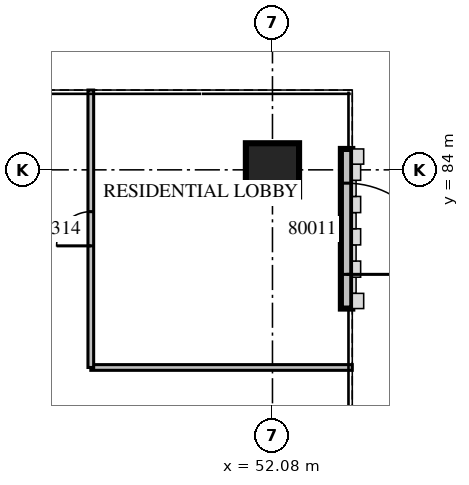
"""IFC4 building model, lengths in metres.
Left out: names, types, materials, properties, quantities, classifications, styles, units other than length and angle.
Written with IfcOpenShell. Run it as: python <this file> out.ifc"""

import sys

from ifc_helpers import new_model, si_unit, direction, frame, frame_2d, origin, origin_2d, place, context, subcontext, project, spatial, rectangle, extrude, source, transform, mapped, element, fill, save


model = new_model("IFC4")
c1 = context("Model", 3, precision=1e-05, world=origin(), true_north=direction((0.0, 1.0)))
c2 = subcontext(c1, "Body", "Model", "MODEL_VIEW")
j1 = project(units=[si_unit("LENGTHUNIT", "METRE"), si_unit("PLANEANGLEUNIT", "RADIAN")], contexts=[c1])
p1 = place(None, origin())
s1 = spatial("IfcSite", under=j1, at=p1, CompositionType="ELEMENT")
p2 = place(p1, origin())
s2 = spatial("IfcBuilding", under=s1, at=p2, CompositionType="ELEMENT")
p3 = place(p2, origin())
s3 = spatial("IfcBuildingStorey", under=s2, at=p3, CompositionType="ELEMENT", Elevation=0.0)
m1 = source(origin(), c2, "Body", "SweptSolid", [
    extrude(rectangle(XDim=1.4, YDim=1.4, at=origin_2d()), origin(), (0.0, 0.0, 1.0), 7.5),
])
p4 = place(p3, frame((52.08, 84.0, 0.0), z_axis=(0.0, 0.0, 1.0), x_axis=(1.0, 0.0, 0.0)))
e1 = element("IfcColumn", 1, at=p4, inside=s3, PredefinedType="COLUMN", context=c2, shape_type="MappedRepresentation", body=[
    mapped(m1, transform((0.0, 0.0, 0.0), scale=1.0)),
])
m2 = source(origin(), c2, "Body", "SweptSolid", [
    extrude(rectangle(XDim=4.2, YDim=0.3, at=frame_2d((2.1, 0.0))), origin(), (0.0, 0.0, 1.0), 6.9),
])
p5 = place(p3, frame((54.03, 80.35, 0.0), z_axis=(0.0, 0.0, 1.0), x_axis=(0.0, 1.0, 0.0)))
e2 = element("IfcWall", 2, at=p5, inside=s3, PredefinedType="STANDARD", context=c2, shape_type="MappedRepresentation", body=[
    mapped(m2, transform((0.0, 0.0, 0.0), scale=1.0)),
])
m3 = source(origin(), c2, "Body", "SweptSolid", [
    extrude(rectangle(XDim=2.4, YDim=2.4, at=frame_2d((1.2, 1.2))), frame((0.0, 0.16, 0.0), z_axis=(0.0, -1.0, 0.0), x_axis=(1.0, 0.0, 0.0)), (0.0, 0.0, 1.0), 0.32),
])
p6 = place(p5, frame((0.9, 0.0, 0.0)))
e3 = element("IfcOpeningElement", 3, at=p6, cuts=e2, PredefinedType="OPENING", context=c2, shape_type="MappedRepresentation", body=[
    mapped(m3, transform((0.0, 0.0, 0.0), scale=1.0)),
])
m4 = source(origin(), c2, "Body", "SweptSolid", [
    extrude(rectangle(XDim=6.88, YDim=0.15, at=frame_2d((3.44, 0.0))), origin(), (0.0, 0.0, 1.0), 6.9),
])
p7 = place(p3, frame((47.3, 78.8, 0.0), z_axis=(0.0, 0.0, 1.0), x_axis=(1.0, 0.0, 0.0)))
e4 = element("IfcWall", 4, at=p7, inside=s3, PredefinedType="PARTITIONING", context=c2, shape_type="MappedRepresentation", body=[
    mapped(m4, transform((0.0, 0.0, 0.0), scale=1.0)),
])
m5 = source(origin(), c2, "Body", "SweptSolid", [
    extrude(rectangle(XDim=7.3, YDim=0.15, at=frame_2d((3.65, 0.0))), origin(), (0.0, 0.0, 1.0), 6.9),
])
p8 = place(p3, frame((47.3, 78.8, 0.0), z_axis=(0.0, 0.0, 1.0), x_axis=(0.0, 1.0, 0.0)))
e5 = element("IfcWall", 5, at=p8, inside=s3, PredefinedType="PARTITIONING", context=c2, shape_type="MappedRepresentation", body=[
    mapped(m5, transform((0.0, 0.0, 0.0), scale=1.0)),
])
m6 = source(origin(), c2, "Body", "SweptSolid", [
    extrude(rectangle(XDim=0.9, YDim=2.1, at=frame_2d((0.45, 1.05))), frame((0.0, 0.085, 0.0), z_axis=(0.0, -1.0, 0.0), x_axis=(1.0, 0.0, 0.0)), (0.0, 0.0, 1.0), 0.17),
])
p9 = place(p8, frame((3.2, 0.0, 0.0)))
e6 = element("IfcOpeningElement", 6, at=p9, cuts=e5, PredefinedType="OPENING", context=c2, shape_type="MappedRepresentation", body=[
    mapped(m6, transform((0.0, 0.0, 0.0), scale=1.0)),
])
m7 = source(origin(), c2, "Body", "SweptSolid", [
    extrude(rectangle(XDim=2.4, YDim=2.4, at=frame_2d((1.2, 1.2))), frame((0.0, 0.025, 0.0), z_axis=(0.0, -1.0, 0.0), x_axis=(1.0, 0.0, 0.0)), (0.0, 0.0, 1.0), 0.05),
])
p10 = place(p6, origin())
e7 = element("IfcDoor", 7, at=p10, inside=s3, OperationType="DOUBLE_DOOR_SINGLE_SWING", PredefinedType="DOOR", context=c2, shape_type="MappedRepresentation", body=[
    mapped(m7, transform((0.0, 0.0, 0.0), scale=1.0)),
])
fill(e3, e7)
m8 = source(origin(), c2, "Body", "SweptSolid", [
    extrude(rectangle(XDim=0.9, YDim=2.1, at=frame_2d((0.45, 1.05))), frame((0.0, 0.025, 0.0), z_axis=(0.0, -1.0, 0.0), x_axis=(1.0, 0.0, 0.0)), (0.0, 0.0, 1.0), 0.05),
])
p11 = place(p9, origin())
e8 = element("IfcDoor", 8, at=p11, inside=s3, OperationType="SINGLE_SWING_LEFT", PredefinedType="DOOR", context=c2, shape_type="MappedRepresentation", body=[
    mapped(m8, transform((0.0, 0.0, 0.0), scale=1.0)),
])
fill(e6, e8)
save(model, sys.argv[1])
